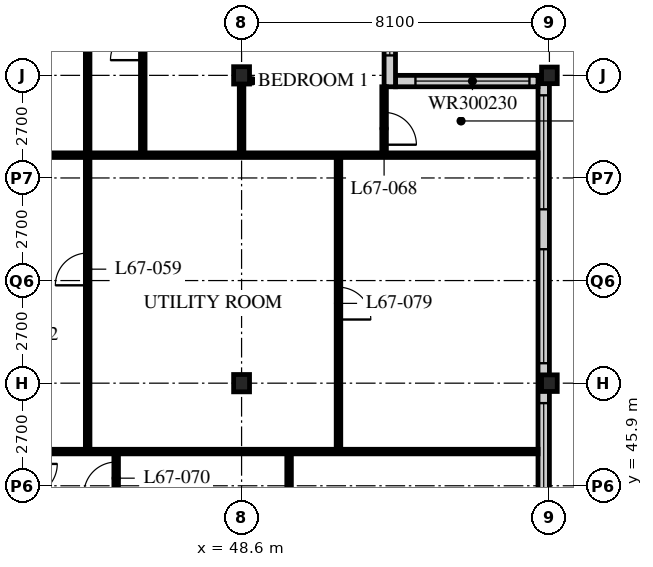
"""IFC4 building model, lengths in metres.
Left out: names, types, materials, properties, quantities, classifications, styles, units other than length and angle.
Written with IfcOpenShell. Run it as: python <this file> out.ifc"""

import sys

from ifc_helpers import new_model, si_unit, direction, frame, frame_2d, origin, origin_2d, place, context, subcontext, project, spatial, rectangle, i_section, extrude, element, fill, save


model = new_model("IFC4")
c1 = context("Model", 3, precision=1e-05, world=origin(), true_north=direction((0.0, 1.0)))
c2 = subcontext(c1, "Body", "Model", "MODEL_VIEW")
j1 = project(units=[si_unit("LENGTHUNIT", "METRE"), si_unit("PLANEANGLEUNIT", "RADIAN")], contexts=[c1])
p1 = place(None, origin())
s1 = spatial("IfcSite", under=j1, at=p1, CompositionType="ELEMENT")
p2 = place(p1, origin())
s2 = spatial("IfcBuilding", under=s1, at=p2, CompositionType="ELEMENT")
p3 = place(p2, frame((0.0, 0.0, 261.9)))
s3 = spatial("IfcBuildingStorey", under=s2, at=p3, CompositionType="ELEMENT", Elevation=261.9)
for number, where, z_axis, x_axis in (
    (1, (48.6, 48.6, 0.0), (0.0, 0.0, 1.0), (1.0, 0.0, 0.0)),
    (2, (48.6, 56.7, 0.0), (0.0, 0.0, 1.0), (1.0, 0.0, 0.0)),
):
    element("IfcColumn", number, at=place(p3, frame(where, z_axis=z_axis, x_axis=x_axis)), inside=s3, PredefinedType="COLUMN", context=c2, shape_type="SweptSolid", body=[
        extrude(i_section(OverallWidth=0.418, OverallDepth=0.456, WebThickness=0.042, FlangeThickness=0.067, FilletRadius=0.015, at=origin_2d()), origin(), (0.0, 0.0, 1.0), 3.9),
    ])
for number, where, z_axis, x_axis in (
    (3, (56.7, 48.6, 0.0), (0.0, 0.0, 1.0), (1.0, 0.0, 0.0)),
    (4, (56.7, 56.7, 0.0), (0.0, 0.0, 1.0), (1.0, 0.0, 0.0)),
):
    element("IfcColumn", number, at=place(p3, frame(where, z_axis=z_axis, x_axis=x_axis)), inside=s3, PredefinedType="COLUMN", context=c2, shape_type="SweptSolid", body=[
        extrude(i_section(OverallWidth=0.412, OverallDepth=0.437, WebThickness=0.036, FlangeThickness=0.058, FilletRadius=0.015, at=origin_2d()), origin(), (0.0, 0.0, 1.0), 3.9),
    ])
p4 = place(p3, frame((56.55, 24.6, 0.0), z_axis=(0.0, 0.0, 1.0), x_axis=(0.0, 1.0, 0.0)))
e5 = element("IfcWall", 5, at=p4, inside=s3, PredefinedType="SOLIDWALL", context=c2, shape_type="SweptSolid", body=[
    extrude(rectangle(XDim=32.1, YDim=0.3, at=frame_2d((16.05, 0.0))), origin(), (0.0, 0.0, 1.0), 3.69),
])
p5 = place(p4, frame((0.225, 0.0, 0.6)))
e6 = element("IfcOpeningElement", 6, at=p5, cuts=e5, PredefinedType="OPENING", context=c2, shape_type="SweptSolid", body=[
    extrude(rectangle(XDim=3.0, YDim=2.4, at=frame_2d((1.5, 1.2))), frame((0.0, 0.16, 0.0), z_axis=(0.0, -1.0, 0.0), x_axis=(1.0, 0.0, 0.0)), (0.0, 0.0, 1.0), 0.32),
])
p6 = place(p4, frame((4.275, 0.0, 0.6)))
e7 = element("IfcOpeningElement", 7, at=p6, cuts=e5, PredefinedType="OPENING", context=c2, shape_type="SweptSolid", body=[
    extrude(rectangle(XDim=3.0, YDim=2.4, at=frame_2d((1.5, 1.2))), frame((0.0, 0.16, 0.0), z_axis=(0.0, -1.0, 0.0), x_axis=(1.0, 0.0, 0.0)), (0.0, 0.0, 1.0), 0.32),
])
p7 = place(p4, frame((8.325, 0.0, 0.6)))
e8 = element("IfcOpeningElement", 8, at=p7, cuts=e5, PredefinedType="OPENING", context=c2, shape_type="SweptSolid", body=[
    extrude(rectangle(XDim=3.0, YDim=2.4, at=frame_2d((1.5, 1.2))), frame((0.0, 0.16, 0.0), z_axis=(0.0, -1.0, 0.0), x_axis=(1.0, 0.0, 0.0)), (0.0, 0.0, 1.0), 0.32),
])
p8 = place(p4, frame((12.375, 0.0, 0.6)))
e9 = element("IfcOpeningElement", 9, at=p8, cuts=e5, PredefinedType="OPENING", context=c2, shape_type="SweptSolid", body=[
    extrude(rectangle(XDim=3.0, YDim=2.4, at=frame_2d((1.5, 1.2))), frame((0.0, 0.16, 0.0), z_axis=(0.0, -1.0, 0.0), x_axis=(1.0, 0.0, 0.0)), (0.0, 0.0, 1.0), 0.32),
])
p9 = place(p4, frame((16.425, 0.0, 0.6)))
e10 = element("IfcOpeningElement", 10, at=p9, cuts=e5, PredefinedType="OPENING", context=c2, shape_type="SweptSolid", body=[
    extrude(rectangle(XDim=3.0, YDim=2.4, at=frame_2d((1.5, 1.2))), frame((0.0, 0.16, 0.0), z_axis=(0.0, -1.0, 0.0), x_axis=(1.0, 0.0, 0.0)), (0.0, 0.0, 1.0), 0.32),
])
p10 = place(p4, frame((20.475, 0.0, 0.6)))
e11 = element("IfcOpeningElement", 11, at=p10, cuts=e5, PredefinedType="OPENING", context=c2, shape_type="SweptSolid", body=[
    extrude(rectangle(XDim=3.0, YDim=2.4, at=frame_2d((1.5, 1.2))), frame((0.0, 0.16, 0.0), z_axis=(0.0, -1.0, 0.0), x_axis=(1.0, 0.0, 0.0)), (0.0, 0.0, 1.0), 0.32),
])
p11 = place(p4, frame((24.525, 0.0, 0.6)))
e12 = element("IfcOpeningElement", 12, at=p11, cuts=e5, PredefinedType="OPENING", context=c2, shape_type="SweptSolid", body=[
    extrude(rectangle(XDim=3.0, YDim=2.4, at=frame_2d((1.5, 1.2))), frame((0.0, 0.16, 0.0), z_axis=(0.0, -1.0, 0.0), x_axis=(1.0, 0.0, 0.0)), (0.0, 0.0, 1.0), 0.32),
])
p12 = place(p4, frame((28.575, 0.0, 0.6)))
e13 = element("IfcOpeningElement", 13, at=p12, cuts=e5, PredefinedType="OPENING", context=c2, shape_type="SweptSolid", body=[
    extrude(rectangle(XDim=3.0, YDim=2.4, at=frame_2d((1.5, 1.2))), frame((0.0, 0.16, 0.0), z_axis=(0.0, -1.0, 0.0), x_axis=(1.0, 0.0, 0.0)), (0.0, 0.0, 1.0), 0.32),
])
p13 = place(p3, frame((56.4, 56.55, 0.0), z_axis=(0.0, 0.0, 1.0), x_axis=(-1.0, 0.0, 0.0)))
e14 = element("IfcWall", 14, at=p13, inside=s3, PredefinedType="SOLIDWALL", context=c2, shape_type="SweptSolid", body=[
    extrude(rectangle(XDim=3.75, YDim=0.3, at=frame_2d((1.875, 0.0))), origin(), (0.0, 0.0, 1.0), 3.69),
])
p14 = place(p13, frame((0.225, 0.0, 0.6)))
e15 = element("IfcOpeningElement", 15, at=p14, cuts=e14, PredefinedType="OPENING", context=c2, shape_type="SweptSolid", body=[
    extrude(rectangle(XDim=3.0, YDim=2.3, at=frame_2d((1.5, 1.15))), frame((0.0, 0.16, 0.0), z_axis=(0.0, -1.0, 0.0), x_axis=(1.0, 0.0, 0.0)), (0.0, 0.0, 1.0), 0.32),
])
p15 = place(p3, frame((52.5, 56.4, 0.0), z_axis=(0.0, 0.0, 1.0), x_axis=(0.0, 1.0, 0.0)))
e16 = element("IfcWall", 16, at=p15, inside=s3, PredefinedType="SOLIDWALL", context=c2, shape_type="SweptSolid", body=[
    extrude(rectangle(XDim=4.35, YDim=0.3, at=frame_2d((2.175, 0.0))), origin(), (0.0, 0.0, 1.0), 3.69),
])
p16 = place(p15, frame((0.825, 0.0, 0.6)))
e17 = element("IfcOpeningElement", 17, at=p16, cuts=e16, PredefinedType="OPENING", context=c2, shape_type="SweptSolid", body=[
    extrude(rectangle(XDim=3.0, YDim=2.3, at=frame_2d((1.5, 1.15))), frame((0.0, 0.16, 0.0), z_axis=(0.0, -1.0, 0.0), x_axis=(1.0, 0.0, 0.0)), (0.0, 0.0, 1.0), 0.32),
])
p17 = place(p3, frame((42.9, 46.8, 0.0), z_axis=(0.0, 0.0, 1.0), x_axis=(1.0, 0.0, 0.0)))
e18 = element("IfcWall", 18, at=p17, inside=s3, PredefinedType="PARTITIONING", context=c2, shape_type="SweptSolid", body=[
    extrude(rectangle(XDim=13.5, YDim=0.12, at=frame_2d((6.75, 0.0))), origin(), (0.0, 0.0, 1.0), 3.69),
])
p18 = place(p3, frame((36.45, 54.6, 0.0), z_axis=(0.0, 0.0, 1.0), x_axis=(1.0, 0.0, 0.0)))
e19 = element("IfcWall", 19, at=p18, inside=s3, PredefinedType="PARTITIONING", context=c2, shape_type="SweptSolid", body=[
    extrude(rectangle(XDim=19.95, YDim=0.12, at=frame_2d((9.975, 0.0))), origin(), (0.0, 0.0, 1.0), 3.69),
])
p19 = place(p18, frame((1.675, 0.0, 0.0)))
e20 = element("IfcOpeningElement", 20, at=p19, cuts=e19, PredefinedType="OPENING", context=c2, shape_type="SweptSolid", body=[
    extrude(rectangle(XDim=0.85, YDim=2.1, at=frame_2d((0.425, 1.05))), frame((0.0, 0.07, 0.0), z_axis=(0.0, -1.0, 0.0), x_axis=(1.0, 0.0, 0.0)), (0.0, 0.0, 1.0), 0.14),
])
p20 = place(p3, frame((44.55, 64.5, 0.0), z_axis=(0.0, 0.0, 1.0), x_axis=(0.0, -1.0, 0.0)))
e21 = element("IfcWall", 21, at=p20, inside=s3, PredefinedType="PARTITIONING", context=c2, shape_type="SweptSolid", body=[
    extrude(rectangle(XDim=17.7, YDim=0.12, at=frame_2d((8.85, 0.0))), origin(), (0.0, 0.0, 1.0), 3.69),
])
p21 = place(p20, frame((12.475, 0.0, 0.0)))
e22 = element("IfcOpeningElement", 22, at=p21, cuts=e21, PredefinedType="OPENING", context=c2, shape_type="SweptSolid", body=[
    extrude(rectangle(XDim=0.85, YDim=2.1, at=frame_2d((0.425, 1.05))), frame((0.0, 0.07, 0.0), z_axis=(0.0, -1.0, 0.0), x_axis=(1.0, 0.0, 0.0)), (0.0, 0.0, 1.0), 0.14),
])
p22 = place(p20, frame((4.525, 0.0, 0.0)))
e23 = element("IfcOpeningElement", 23, at=p22, cuts=e21, PredefinedType="OPENING", context=c2, shape_type="SweptSolid", body=[
    extrude(rectangle(XDim=0.85, YDim=2.1, at=frame_2d((0.425, 1.05))), frame((0.0, 0.07, 0.0), z_axis=(0.0, -1.0, 0.0), x_axis=(1.0, 0.0, 0.0)), (0.0, 0.0, 1.0), 0.14),
])
p23 = place(p3, frame((52.35, 54.6, 0.0), z_axis=(0.0, 0.0, 1.0), x_axis=(0.0, 1.0, 0.0)))
e24 = element("IfcWall", 24, at=p23, inside=s3, PredefinedType="PARTITIONING", context=c2, shape_type="SweptSolid", body=[
    extrude(rectangle(XDim=1.8, YDim=0.12, at=frame_2d((0.9, 0.0))), origin(), (0.0, 0.0, 1.0), 3.69),
])
p24 = place(p23, frame((0.275, 0.0, 0.0)))
e25 = element("IfcOpeningElement", 25, at=p24, cuts=e24, PredefinedType="OPENING", context=c2, shape_type="SweptSolid", body=[
    extrude(rectangle(XDim=0.85, YDim=2.1, at=frame_2d((0.425, 1.05))), frame((0.0, 0.07, 0.0), z_axis=(0.0, -1.0, 0.0), x_axis=(1.0, 0.0, 0.0)), (0.0, 0.0, 1.0), 0.14),
])
p25 = place(p3, frame((45.3, 46.8, 0.0), z_axis=(0.0, 0.0, 1.0), x_axis=(0.0, -1.0, 0.0)))
e26 = element("IfcWall", 26, at=p25, inside=s3, PredefinedType="PARTITIONING", context=c2, shape_type="SweptSolid", body=[
    extrude(rectangle(XDim=4.01, YDim=0.12, at=frame_2d((2.005, 0.0))), origin(), (0.0, 0.0, 1.0), 3.69),
])
p26 = place(p25, frame((0.275, 0.0, 0.0)))
e27 = element("IfcOpeningElement", 27, at=p26, cuts=e26, PredefinedType="OPENING", context=c2, shape_type="SweptSolid", body=[
    extrude(rectangle(XDim=0.85, YDim=2.1, at=frame_2d((0.425, 1.05))), frame((0.0, 0.07, 0.0), z_axis=(0.0, -1.0, 0.0), x_axis=(1.0, 0.0, 0.0)), (0.0, 0.0, 1.0), 0.14),
])
p27 = place(p3, frame((51.15, 46.8, 0.0), z_axis=(0.0, 0.0, 1.0), x_axis=(0.0, 1.0, 0.0)))
e28 = element("IfcWall", 28, at=p27, inside=s3, PredefinedType="PARTITIONING", context=c2, shape_type="SweptSolid", body=[
    extrude(rectangle(XDim=7.8, YDim=0.12, at=frame_2d((3.9, 0.0))), origin(), (0.0, 0.0, 1.0), 3.69),
])
p28 = place(p27, frame((3.475, 0.0, 0.0)))
e29 = element("IfcOpeningElement", 29, at=p28, cuts=e28, PredefinedType="OPENING", context=c2, shape_type="SweptSolid", body=[
    extrude(rectangle(XDim=0.85, YDim=2.1, at=frame_2d((0.425, 1.05))), frame((0.0, 0.07, 0.0), z_axis=(0.0, -1.0, 0.0), x_axis=(1.0, 0.0, 0.0)), (0.0, 0.0, 1.0), 0.14),
])
p29 = place(p3, frame((46.0, 54.6, 0.0), z_axis=(0.0, 0.0, 1.0), x_axis=(0.0, 1.0, 0.0)))
e30 = element("IfcWall", 30, at=p29, inside=s3, PredefinedType="PARTITIONING", context=c2, shape_type="SweptSolid", body=[
    extrude(rectangle(XDim=5.85, YDim=0.12, at=frame_2d((2.925, 0.0))), origin(), (0.0, 0.0, 1.0), 3.69),
])
p30 = place(p29, frame((2.5, 0.0, 0.0)))
e31 = element("IfcOpeningElement", 31, at=p30, cuts=e30, PredefinedType="OPENING", context=c2, shape_type="SweptSolid", body=[
    extrude(rectangle(XDim=0.85, YDim=2.1, at=frame_2d((0.425, 1.05))), frame((0.0, 0.07, 0.0), z_axis=(0.0, -1.0, 0.0), x_axis=(1.0, 0.0, 0.0)), (0.0, 0.0, 1.0), 0.14),
])
p31 = place(p3, frame((49.85, 40.5, 0.0), z_axis=(0.0, 0.0, 1.0), x_axis=(0.0, 1.0, 0.0)))
e32 = element("IfcWall", 32, at=p31, inside=s3, PredefinedType="PARTITIONING", context=c2, shape_type="SweptSolid", body=[
    extrude(rectangle(XDim=6.3, YDim=0.12, at=frame_2d((3.15, 0.0))), origin(), (0.0, 0.0, 1.0), 3.69),
])
p32 = place(p31, frame((2.725, 0.0, 0.0)))
e33 = element("IfcOpeningElement", 33, at=p32, cuts=e32, PredefinedType="OPENING", context=c2, shape_type="SweptSolid", body=[
    extrude(rectangle(XDim=0.85, YDim=2.1, at=frame_2d((0.425, 1.05))), frame((0.0, 0.07, 0.0), z_axis=(0.0, -1.0, 0.0), x_axis=(1.0, 0.0, 0.0)), (0.0, 0.0, 1.0), 0.14),
])
p33 = place(p3, frame((48.6, 54.6, 0.0), z_axis=(0.0, 0.0, 1.0), x_axis=(0.0, 1.0, 0.0)))
e34 = element("IfcWall", 34, at=p33, inside=s3, PredefinedType="PARTITIONING", context=c2, shape_type="SweptSolid", body=[
    extrude(rectangle(XDim=1.897, YDim=0.12, at=frame_2d((0.948, 0.0))), origin(), (0.0, 0.0, 1.0), 3.078),
])
p34 = place(p10, origin())
e35 = element("IfcWindow", 35, at=p34, inside=s3, PartitioningType="SINGLE_PANEL", PredefinedType="WINDOW", context=c2, shape_type="SweptSolid", body=[
    extrude(rectangle(XDim=3.0, YDim=2.4, at=frame_2d((1.5, 1.2))), frame((0.0, 0.03, 0.0), z_axis=(0.0, -1.0, 0.0), x_axis=(1.0, 0.0, 0.0)), (0.0, 0.0, 1.0), 0.06),
])
fill(e11, e35)
p35 = place(p11, origin())
e36 = element("IfcWindow", 36, at=p35, inside=s3, PartitioningType="SINGLE_PANEL", PredefinedType="WINDOW", context=c2, shape_type="SweptSolid", body=[
    extrude(rectangle(XDim=3.0, YDim=2.4, at=frame_2d((1.5, 1.2))), frame((0.0, 0.03, 0.0), z_axis=(0.0, -1.0, 0.0), x_axis=(1.0, 0.0, 0.0)), (0.0, 0.0, 1.0), 0.06),
])
fill(e12, e36)
p36 = place(p12, origin())
e37 = element("IfcWindow", 37, at=p36, inside=s3, PartitioningType="SINGLE_PANEL", PredefinedType="WINDOW", context=c2, shape_type="SweptSolid", body=[
    extrude(rectangle(XDim=3.0, YDim=2.4, at=frame_2d((1.5, 1.2))), frame((0.0, 0.03, 0.0), z_axis=(0.0, -1.0, 0.0), x_axis=(1.0, 0.0, 0.0)), (0.0, 0.0, 1.0), 0.06),
])
fill(e13, e37)
p37 = place(p14, origin())
e38 = element("IfcWindow", 38, at=p37, inside=s3, PartitioningType="SINGLE_PANEL", PredefinedType="WINDOW", context=c2, shape_type="SweptSolid", body=[
    extrude(rectangle(XDim=3.0, YDim=2.3, at=frame_2d((1.5, 1.15))), frame((0.0, 0.03, 0.0), z_axis=(0.0, -1.0, 0.0), x_axis=(1.0, 0.0, 0.0)), (0.0, 0.0, 1.0), 0.06),
])
fill(e15, e38)
p38 = place(p16, origin())
e39 = element("IfcWindow", 39, at=p38, inside=s3, PartitioningType="SINGLE_PANEL", PredefinedType="WINDOW", context=c2, shape_type="SweptSolid", body=[
    extrude(rectangle(XDim=3.0, YDim=2.3, at=frame_2d((1.5, 1.15))), frame((0.0, 0.03, 0.0), z_axis=(0.0, -1.0, 0.0), x_axis=(1.0, 0.0, 0.0)), (0.0, 0.0, 1.0), 0.06),
])
fill(e17, e39)
p39 = place(p21, origin())
e40 = element("IfcDoor", 40, at=p39, inside=s3, OperationType="SINGLE_SWING_LEFT", PredefinedType="DOOR", context=c2, shape_type="SweptSolid", body=[
    extrude(rectangle(XDim=0.85, YDim=2.1, at=frame_2d((0.425, 1.05))), frame((0.0, 0.025, 0.0), z_axis=(0.0, -1.0, 0.0), x_axis=(1.0, 0.0, 0.0)), (0.0, 0.0, 1.0), 0.05),
])
fill(e22, e40)
p40 = place(p24, origin())
e41 = element("IfcDoor", 41, at=p40, inside=s3, OperationType="SINGLE_SWING_RIGHT", PredefinedType="DOOR", context=c2, shape_type="SweptSolid", body=[
    extrude(rectangle(XDim=0.85, YDim=2.1, at=frame_2d((0.425, 1.05))), frame((0.0, 0.025, 0.0), z_axis=(0.0, -1.0, 0.0), x_axis=(1.0, 0.0, 0.0)), (0.0, 0.0, 1.0), 0.05),
])
fill(e25, e41)
p41 = place(p26, origin())
e42 = element("IfcDoor", 42, at=p41, inside=s3, OperationType="SINGLE_SWING_LEFT", PredefinedType="DOOR", context=c2, shape_type="SweptSolid", body=[
    extrude(rectangle(XDim=0.85, YDim=2.1, at=frame_2d((0.425, 1.05))), frame((0.0, 0.025, 0.0), z_axis=(0.0, -1.0, 0.0), x_axis=(1.0, 0.0, 0.0)), (0.0, 0.0, 1.0), 0.05),
])
fill(e27, e42)
p42 = place(p28, origin())
e43 = element("IfcDoor", 43, at=p42, inside=s3, OperationType="SINGLE_SWING_RIGHT", PredefinedType="DOOR", context=c2, shape_type="SweptSolid", body=[
    extrude(rectangle(XDim=0.85, YDim=2.1, at=frame_2d((0.425, 1.05))), frame((0.0, 0.025, 0.0), z_axis=(0.0, -1.0, 0.0), x_axis=(1.0, 0.0, 0.0)), (0.0, 0.0, 1.0), 0.05),
])
fill(e29, e43)
p43 = place(p30, origin())
e44 = element("IfcDoor", 44, at=p43, inside=s3, OperationType="SINGLE_SWING_LEFT", PredefinedType="DOOR", context=c2, shape_type="SweptSolid", body=[
    extrude(rectangle(XDim=0.85, YDim=2.1, at=frame_2d((0.425, 1.05))), frame((0.0, 0.025, 0.0), z_axis=(0.0, -1.0, 0.0), x_axis=(1.0, 0.0, 0.0)), (0.0, 0.0, 1.0), 0.05),
])
fill(e31, e44)
save(model, sys.argv[1])
